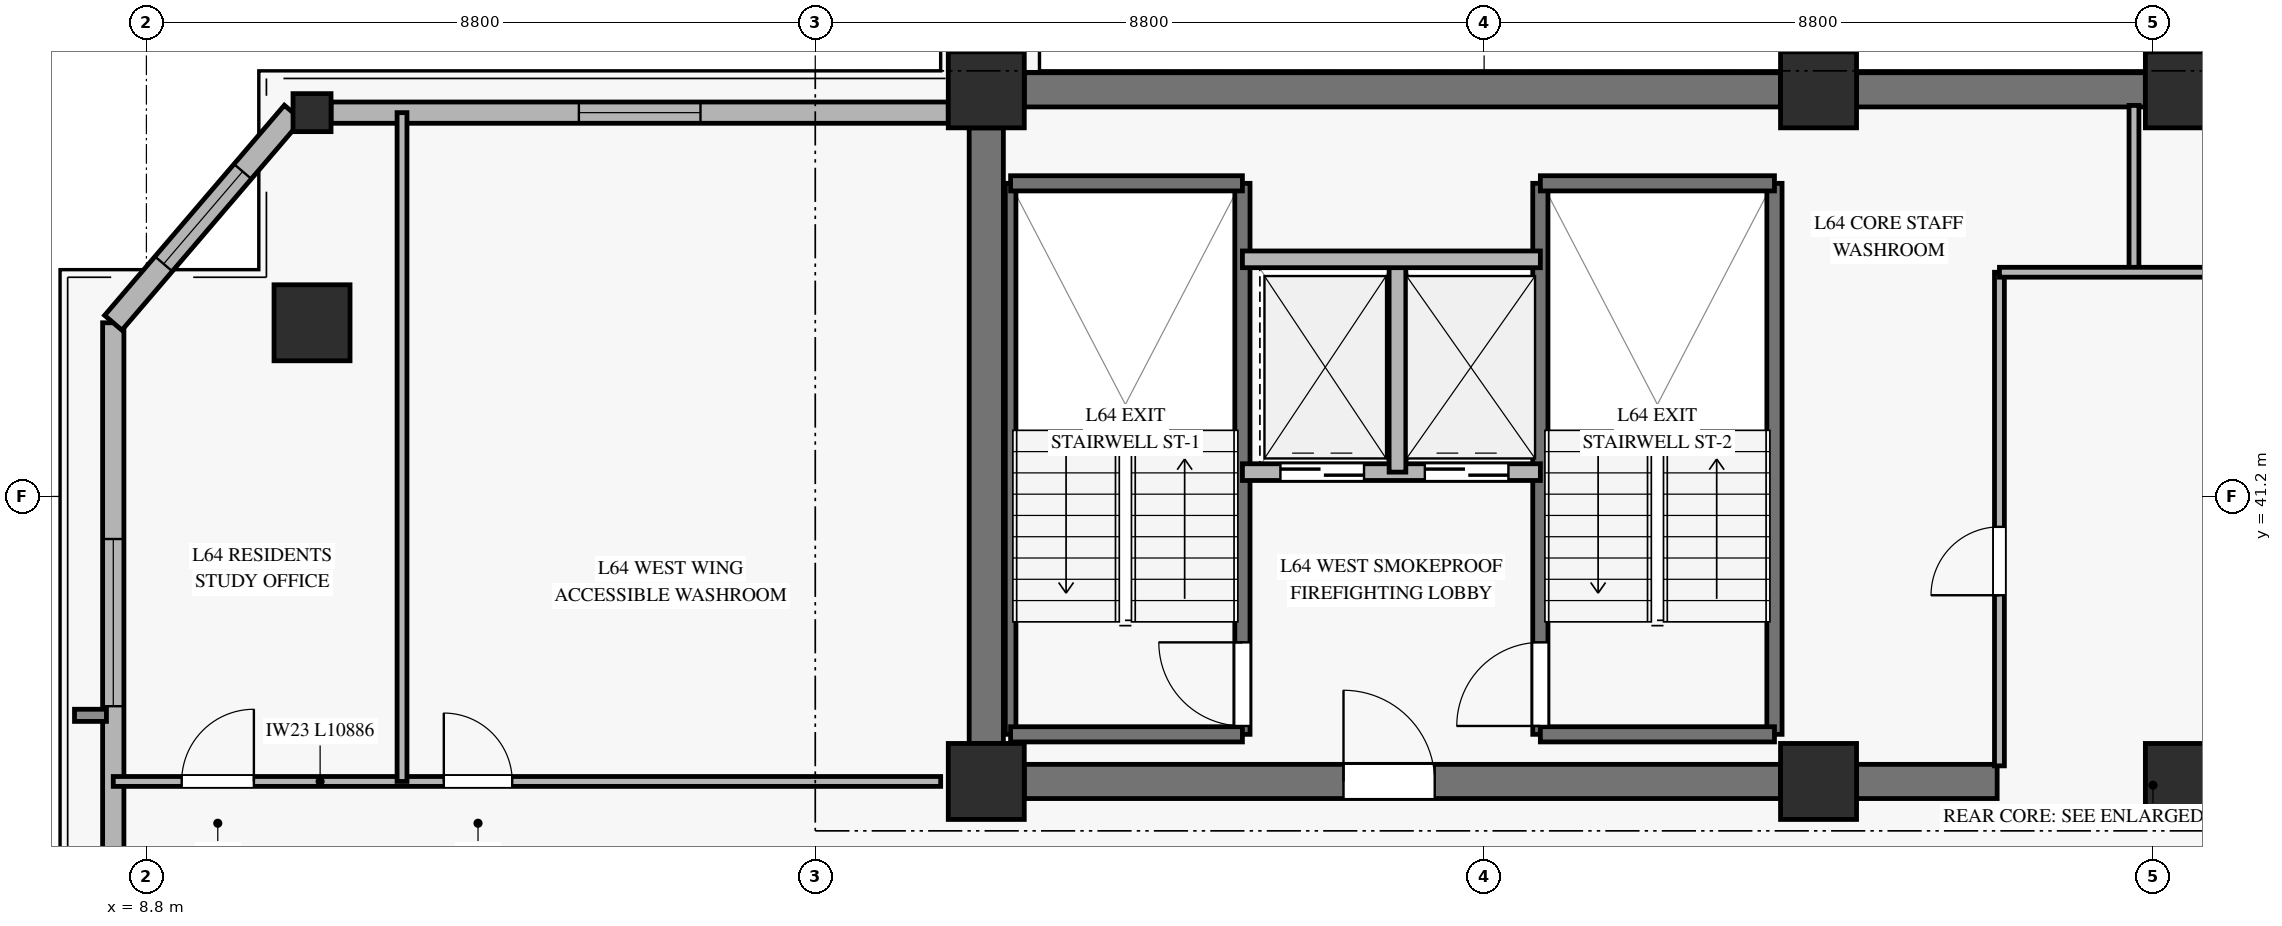
"""IFC4 building model, lengths in metres.
Left out: names, types, materials, properties, quantities, classifications, styles, units other than length and angle.
Written with IfcOpenShell. Run it as: python <this file> out.ifc"""

import sys

from ifc_helpers import new_model, si_unit, direction, frame, frame_2d, origin, origin_2d, place, context, subcontext, project, spatial, rectangle, hollow_rectangle, extrude, source, transform, mapped, element, fill, save


model = new_model("IFC4")
c1 = context("Model", 3, precision=1e-05, world=origin(), true_north=direction((0.0, 1.0)))
c2 = subcontext(c1, "Body", "Model", "MODEL_VIEW")
j1 = project(units=[si_unit("LENGTHUNIT", "METRE"), si_unit("PLANEANGLEUNIT", "RADIAN")], contexts=[c1])
p1 = place(None, origin())
s1 = spatial("IfcSite", under=j1, at=p1, CompositionType="ELEMENT")
p2 = place(p1, origin())
s2 = spatial("IfcBuilding", under=s1, at=p2, CompositionType="ELEMENT")
p3 = place(p2, frame((0.0, 0.0, 251.9)))
s3 = spatial("IfcBuildingStorey", under=s2, at=p3, CompositionType="ELEMENT", Elevation=251.9)
m1 = source(origin(), c2, "Body", "SweptSolid", [
    extrude(rectangle(XDim=1.0, YDim=1.0, at=origin_2d()), origin(), (0.0, 0.0, 1.0), 3.185),
])
for number, where, z_axis, x_axis in (
    (1, (19.85, 37.45, 0.0), (0.0, 0.0, 1.0), (1.0, 0.0, 0.0)),
    (2, (19.85, 46.55, 0.0), (0.0, 0.0, 1.0), (1.0, 0.0, 0.0)),
    (3, (30.8, 37.45, 0.0), (0.0, 0.0, 1.0), (1.0, 0.0, 0.0)),
    (4, (30.8, 46.55, 0.0), (0.0, 0.0, 1.0), (1.0, 0.0, 0.0)),
    (5, (35.6, 37.45, 0.0), (0.0, 0.0, 1.0), (1.0, 0.0, 0.0)),
    (6, (35.6, 46.55, 0.0), (0.0, 0.0, 1.0), (1.0, 0.0, 0.0)),
):
    element("IfcColumn", number, at=place(p3, frame(where, z_axis=z_axis, x_axis=x_axis)), inside=s3, PredefinedType="PILASTER", context=c2, shape_type="MappedRepresentation", body=[
        mapped(m1, transform((0.0, 0.0, 0.0), x_axis=(1.0, 0.0, 0.0), y_axis=(0.0, 1.0, 0.0), z_axis=(0.0, 0.0, 1.0), scale=1.0)),
    ])
p4 = place(p3, frame((20.35, 46.55, 0.0), z_axis=(0.0, 0.0, 1.0), x_axis=(1.0, 0.0, 0.0)))
e7 = element("IfcWall", 7, at=p4, inside=s3, PredefinedType="SHEAR", context=c2, shape_type="SweptSolid", body=[
    extrude(rectangle(XDim=9.95, YDim=0.45, at=frame_2d((4.975, 0.0))), origin(), (0.0, 0.0, 1.0), 3.185),
])
p5 = place(p3, frame((31.3, 46.55, 0.0), z_axis=(0.0, 0.0, 1.0), x_axis=(1.0, 0.0, 0.0)))
e8 = element("IfcWall", 8, at=p5, inside=s3, PredefinedType="SHEAR", context=c2, shape_type="SweptSolid", body=[
    extrude(rectangle(XDim=3.8, YDim=0.45, at=frame_2d((1.9, 0.0))), origin(), (0.0, 0.0, 1.0), 3.185),
])
p6 = place(p3, frame((20.35, 37.45, 0.0), z_axis=(0.0, 0.0, 1.0), x_axis=(1.0, 0.0, 0.0)))
e9 = element("IfcWall", 9, at=p6, inside=s3, PredefinedType="SHEAR", context=c2, shape_type="SweptSolid", body=[
    extrude(rectangle(XDim=9.95, YDim=0.45, at=frame_2d((4.975, 0.0))), origin(), (0.0, 0.0, 1.0), 3.185),
])
p7 = place(p6, frame((4.2, 0.0, 0.0)))
e10 = element("IfcOpeningElement", 10, at=p7, cuts=e9, PredefinedType="OPENING", context=c2, shape_type="SweptSolid", body=[
    extrude(rectangle(XDim=1.2, YDim=2.15, at=frame_2d((0.6, 1.075))), frame((0.0, 0.235, 0.0), z_axis=(0.0, -1.0, 0.0), x_axis=(1.0, 0.0, 0.0)), (0.0, 0.0, 1.0), 0.47),
])
p8 = place(p3, frame((31.3, 37.45, 0.0), z_axis=(0.0, 0.0, 1.0), x_axis=(1.0, 0.0, 0.0)))
e11 = element("IfcWall", 11, at=p8, inside=s3, PredefinedType="SHEAR", context=c2, shape_type="SweptSolid", body=[
    extrude(rectangle(XDim=1.85, YDim=0.45, at=frame_2d((0.925, 0.0))), origin(), (0.0, 0.0, 1.0), 3.185),
])
p9 = place(p3, frame((19.85, 37.95, 0.0), z_axis=(0.0, 0.0, 1.0), x_axis=(0.0, 1.0, 0.0)))
e12 = element("IfcWall", 12, at=p9, inside=s3, PredefinedType="SHEAR", context=c2, shape_type="SweptSolid", body=[
    extrude(rectangle(XDim=8.1, YDim=0.45, at=frame_2d((4.05, 0.0))), origin(), (0.0, 0.0, 1.0), 3.185),
])
m2 = source(origin(), c2, "Body", "SweptSolid", [
    extrude(hollow_rectangle(XDim=1.0, YDim=1.0, WallThickness=0.045, at=origin_2d()), origin(), (0.0, 0.0, 1.0), 3.185),
])
p10 = place(p3, frame((10.979, 43.485, 0.0), z_axis=(0.0, 0.0, 1.0), x_axis=(1.0, 0.0, 0.0)))
e13 = element("IfcColumn", 13, at=p10, inside=s3, PredefinedType="COLUMN", context=c2, shape_type="MappedRepresentation", body=[
    mapped(m2, transform((0.0, 0.0, 0.0), x_axis=(1.0, 0.0, 0.0), y_axis=(0.0, 1.0, 0.0), z_axis=(0.0, 0.0, 1.0), scale=1.0)),
])
m3 = source(origin(), c2, "Body", "SweptSolid", [
    extrude(hollow_rectangle(XDim=0.5, YDim=0.5, WallThickness=0.024, at=origin_2d()), origin(), (0.0, 0.0, 1.0), 3.185),
])
p11 = place(p3, frame((10.979, 46.25, 0.0), z_axis=(0.0, 0.0, 1.0), x_axis=(1.0, 0.0, 0.0)))
e14 = element("IfcColumn", 14, at=p11, inside=s3, PredefinedType="COLUMN", context=c2, shape_type="MappedRepresentation", body=[
    mapped(m3, transform((0.0, 0.0, 0.0), x_axis=(1.0, 0.0, 0.0), y_axis=(0.0, 1.0, 0.0), z_axis=(0.0, 0.0, 1.0), scale=1.0)),
])
p12 = place(p3, frame((8.364, 30.857, 0.0), z_axis=(0.0, 0.0, 1.0), x_axis=(0.0, 1.0, 0.0)))
e15 = element("IfcWall", 15, at=p12, inside=s3, PredefinedType="SOLIDWALL", context=c2, shape_type="SweptSolid", body=[
    extrude(rectangle(XDim=12.628, YDim=0.28, at=frame_2d((6.314, 0.0))), origin(), (0.0, 0.0, 1.0), 2.815),
])
p13 = place(p12, frame((7.583, 0.0, 0.45)))
e16 = element("IfcOpeningElement", 16, at=p13, cuts=e15, PredefinedType="OPENING", context=c2, shape_type="SweptSolid", body=[
    extrude(rectangle(XDim=2.2, YDim=2.1, at=frame_2d((1.1, 1.05))), frame((0.0, 0.15, 0.0), z_axis=(0.0, -1.0, 0.0), x_axis=(1.0, 0.0, 0.0)), (0.0, 0.0, 1.0), 0.3),
])
p14 = place(p3, frame((11.229, 46.25, 0.0), z_axis=(0.0, 0.0, 1.0), x_axis=(1.0, 0.0, 0.0)))
e17 = element("IfcWall", 17, at=p14, inside=s3, PredefinedType="SOLIDWALL", context=c2, shape_type="SweptSolid", body=[
    extrude(rectangle(XDim=8.121, YDim=0.28, at=frame_2d((4.061, 0.0))), origin(), (0.0, 0.0, 1.0), 2.815),
])
p15 = place(p14, frame((3.261, 0.0, 0.45)))
e18 = element("IfcOpeningElement", 18, at=p15, cuts=e17, PredefinedType="OPENING", context=c2, shape_type="SweptSolid", body=[
    extrude(rectangle(XDim=1.6, YDim=2.0, at=frame_2d((0.8, 1.0))), frame((0.0, 0.15, 0.0), z_axis=(0.0, -1.0, 0.0), x_axis=(1.0, 0.0, 0.0)), (0.0, 0.0, 1.0), 0.3),
])
p16 = place(p3, frame((10.729, 46.25, 0.0), z_axis=(0.0, 0.0, 1.0), x_axis=(-0.65001186438, -0.759924059472, 0.0)))
e19 = element("IfcWall", 19, at=p16, inside=s3, PredefinedType="SOLIDWALL", context=c2, shape_type="SweptSolid", body=[
    extrude(rectangle(XDim=3.638, YDim=0.3, at=frame_2d((1.819, 0.0))), origin(), (0.0, 0.0, 1.0), 2.815),
])
p17 = place(p16, frame((1.019, 0.0, 0.45)))
e20 = element("IfcOpeningElement", 20, at=p17, cuts=e19, PredefinedType="OPENING", context=c2, shape_type="SweptSolid", body=[
    extrude(rectangle(XDim=1.6, YDim=2.0, at=frame_2d((0.8, 1.0))), frame((0.0, 0.16, 0.0), z_axis=(0.0, -1.0, 0.0), x_axis=(1.0, 0.0, 0.0)), (0.0, 0.0, 1.0), 0.32),
])
p18 = place(p3, frame((20.17, 38.07, 0.0), z_axis=(0.0, 0.0, 1.0), x_axis=(0.0, 1.0, 0.0)))
e21 = element("IfcWall", 21, at=p18, inside=s3, PredefinedType="SOLIDWALL", context=c2, shape_type="SweptSolid", body=[
    extrude(rectangle(XDim=7.25, YDim=0.14, at=frame_2d((3.625, 0.0))), origin(), (0.0, 0.0, 1.0), 3.4),
])
p19 = place(p3, frame((23.22, 38.07, 0.0), z_axis=(0.0, 0.0, 1.0), x_axis=(0.0, 1.0, 0.0)))
e22 = element("IfcWall", 22, at=p19, inside=s3, PredefinedType="SOLIDWALL", context=c2, shape_type="SweptSolid", body=[
    extrude(rectangle(XDim=7.25, YDim=0.2, at=frame_2d((3.625, 0.0))), origin(), (0.0, 0.0, 1.0), 3.4),
])
p20 = place(p19, frame((0.11, 0.0, 0.0)))
e23 = element("IfcOpeningElement", 23, at=p20, cuts=e22, PredefinedType="OPENING", context=c2, shape_type="SweptSolid", body=[
    extrude(rectangle(XDim=1.1, YDim=2.15, at=frame_2d((0.55, 1.075))), frame((0.0, 0.11, 0.0), z_axis=(0.0, -1.0, 0.0), x_axis=(1.0, 0.0, 0.0)), (0.0, 0.0, 1.0), 0.22),
])
for number, where, z_axis, x_axis in (
    (24, (20.17, 45.32, 0.0), (0.0, 0.0, 1.0), (1.0, 0.0, 0.0)),
    (25, (20.17, 38.07, 0.0), (0.0, 0.0, 1.0), (1.0, 0.0, 0.0)),
):
    element("IfcWall", number, at=place(p3, frame(where, z_axis=z_axis, x_axis=x_axis)), inside=s3, PredefinedType="SOLIDWALL", context=c2, shape_type="SweptSolid", body=[
        extrude(rectangle(XDim=3.05, YDim=0.2, at=frame_2d((1.525, 0.0))), origin(), (0.0, 0.0, 1.0), 3.4),
    ])
p21 = place(p3, frame((27.14, 38.07, 0.0), z_axis=(0.0, 0.0, 1.0), x_axis=(0.0, 1.0, 0.0)))
e26 = element("IfcWall", 26, at=p21, inside=s3, PredefinedType="SOLIDWALL", context=c2, shape_type="SweptSolid", body=[
    extrude(rectangle(XDim=7.25, YDim=0.2, at=frame_2d((3.625, 0.0))), origin(), (0.0, 0.0, 1.0), 3.4),
])
p22 = place(p21, frame((0.11, 0.0, 0.0)))
e27 = element("IfcOpeningElement", 27, at=p22, cuts=e26, PredefinedType="OPENING", context=c2, shape_type="SweptSolid", body=[
    extrude(rectangle(XDim=1.1, YDim=2.15, at=frame_2d((0.55, 1.075))), frame((0.0, 0.11, 0.0), z_axis=(0.0, -1.0, 0.0), x_axis=(1.0, 0.0, 0.0)), (0.0, 0.0, 1.0), 0.22),
])
p23 = place(p3, frame((30.22, 38.07, 0.0), z_axis=(0.0, 0.0, 1.0), x_axis=(0.0, 1.0, 0.0)))
e28 = element("IfcWall", 28, at=p23, inside=s3, PredefinedType="SOLIDWALL", context=c2, shape_type="SweptSolid", body=[
    extrude(rectangle(XDim=7.25, YDim=0.2, at=frame_2d((3.625, 0.0))), origin(), (0.0, 0.0, 1.0), 3.4),
])
for number, where, z_axis, x_axis in (
    (29, (27.14, 45.32, 0.0), (0.0, 0.0, 1.0), (1.0, 0.0, 0.0)),
    (30, (27.14, 38.07, 0.0), (0.0, 0.0, 1.0), (1.0, 0.0, 0.0)),
):
    element("IfcWall", number, at=place(p3, frame(where, z_axis=z_axis, x_axis=x_axis)), inside=s3, PredefinedType="SOLIDWALL", context=c2, shape_type="SweptSolid", body=[
        extrude(rectangle(XDim=3.08, YDim=0.2, at=frame_2d((1.54, 0.0))), origin(), (0.0, 0.0, 1.0), 3.4),
    ])
p24 = place(p3, frame((23.22, 41.52, 0.0), z_axis=(0.0, 0.0, 1.0), x_axis=(1.0, 0.0, 0.0)))
e31 = element("IfcWall", 31, at=p24, inside=s3, PredefinedType="SOLIDWALL", context=c2, shape_type="SweptSolid", body=[
    extrude(rectangle(XDim=3.92, YDim=0.22, at=frame_2d((1.96, 0.0))), origin(), (0.0, 0.0, 1.0), 3.185),
])
p25 = place(p24, frame((0.5, 0.0, 0.0)))
e32 = element("IfcOpeningElement", 32, at=p25, cuts=e31, PredefinedType="OPENING", context=c2, shape_type="SweptSolid", body=[
    extrude(rectangle(XDim=1.1, YDim=2.2, at=frame_2d((0.55, 1.1))), frame((0.0, 0.12, 0.0), z_axis=(0.0, -1.0, 0.0), x_axis=(1.0, 0.0, 0.0)), (0.0, 0.0, 1.0), 0.24),
])
p26 = place(p24, frame((2.4, 0.0, 0.0)))
e33 = element("IfcOpeningElement", 33, at=p26, cuts=e31, PredefinedType="OPENING", context=c2, shape_type="SweptSolid", body=[
    extrude(rectangle(XDim=1.1, YDim=2.2, at=frame_2d((0.55, 1.1))), frame((0.0, 0.12, 0.0), z_axis=(0.0, -1.0, 0.0), x_axis=(1.0, 0.0, 0.0)), (0.0, 0.0, 1.0), 0.24),
])
p27 = place(p3, frame((25.26, 41.52, 0.0), z_axis=(0.0, 0.0, 1.0), x_axis=(0.0, 1.0, 0.0)))
e34 = element("IfcWall", 34, at=p27, inside=s3, PredefinedType="SOLIDWALL", context=c2, shape_type="SweptSolid", body=[
    extrude(rectangle(XDim=2.8, YDim=0.22, at=frame_2d((1.4, 0.0))), origin(), (0.0, 0.0, 1.0), 3.185),
])
p28 = place(p3, frame((23.22, 44.32, 0.0), z_axis=(0.0, 0.0, 1.0), x_axis=(1.0, 0.0, 0.0)))
e35 = element("IfcWall", 35, at=p28, inside=s3, PredefinedType="SOLIDWALL", context=c2, shape_type="SweptSolid", body=[
    extrude(rectangle(XDim=3.92, YDim=0.22, at=frame_2d((1.96, 0.0))), origin(), (0.0, 0.0, 1.0), 3.185),
])
p29 = place(p3, frame((33.18, 37.655, 0.0), z_axis=(0.0, 0.0, 1.0), x_axis=(0.0, 1.0, 0.0)))
e36 = element("IfcWall", 36, at=p29, inside=s3, PredefinedType="PARTITIONING", context=c2, shape_type="SweptSolid", body=[
    extrude(rectangle(XDim=6.495, YDim=0.13, at=frame_2d((3.248, 0.0))), origin(), (0.0, 0.0, 1.0), 2.27),
])
p30 = place(p29, frame((2.245, 0.0, 0.0)))
e37 = element("IfcOpeningElement", 37, at=p30, cuts=e36, PredefinedType="OPENING", context=c2, shape_type="SweptSolid", body=[
    extrude(rectangle(XDim=0.9, YDim=2.1, at=frame_2d((0.45, 1.05))), frame((0.0, 0.075, 0.0), z_axis=(0.0, -1.0, 0.0), x_axis=(1.0, 0.0, 0.0)), (0.0, 0.0, 1.0), 0.15),
])
p31 = place(p3, frame((34.95, 44.15, 0.0), z_axis=(0.0, 0.0, 1.0), x_axis=(0.0, 1.0, 0.0)))
e38 = element("IfcWall", 38, at=p31, inside=s3, PredefinedType="PARTITIONING", context=c2, shape_type="SweptSolid", body=[
    extrude(rectangle(XDim=2.195, YDim=0.13, at=frame_2d((1.098, 0.0))), origin(), (0.0, 0.0, 1.0), 3.185),
])
p32 = place(p3, frame((33.18, 44.15, 0.0), z_axis=(0.0, 0.0, 1.0), x_axis=(1.0, 0.0, 0.0)))
e39 = element("IfcWall", 39, at=p32, inside=s3, PredefinedType="PARTITIONING", context=c2, shape_type="SweptSolid", body=[
    extrude(rectangle(XDim=2.94, YDim=0.13, at=frame_2d((1.47, 0.0))), origin(), (0.0, 0.0, 1.0), 2.47),
])
p33 = place(p3, frame((8.364, 37.45, 0.0), z_axis=(0.0, 0.0, 1.0), x_axis=(1.0, 0.0, 0.0)))
e40 = element("IfcWall", 40, at=p33, inside=s3, PredefinedType="PARTITIONING", context=c2, shape_type="SweptSolid", body=[
    extrude(rectangle(XDim=10.886, YDim=0.13, at=frame_2d((5.443, 0.0))), origin(), (0.0, 0.0, 1.0), 2.82),
])
p34 = place(p33, frame((0.9, 0.0, 0.0)))
e41 = element("IfcOpeningElement", 41, at=p34, cuts=e40, PredefinedType="OPENING", context=c2, shape_type="SweptSolid", body=[
    extrude(rectangle(XDim=0.95, YDim=2.1, at=frame_2d((0.475, 1.05))), frame((0.0, 0.075, 0.0), z_axis=(0.0, -1.0, 0.0), x_axis=(1.0, 0.0, 0.0)), (0.0, 0.0, 1.0), 0.15),
])
p35 = place(p33, frame((4.349, 0.0, 0.0)))
e42 = element("IfcOpeningElement", 42, at=p35, cuts=e40, PredefinedType="OPENING", context=c2, shape_type="SweptSolid", body=[
    extrude(rectangle(XDim=0.9, YDim=2.1, at=frame_2d((0.45, 1.05))), frame((0.0, 0.075, 0.0), z_axis=(0.0, -1.0, 0.0), x_axis=(1.0, 0.0, 0.0)), (0.0, 0.0, 1.0), 0.15),
])
p36 = place(p3, frame((12.163, 37.45, 0.0), z_axis=(0.0, 0.0, 1.0), x_axis=(0.0, 1.0, 0.0)))
e43 = element("IfcWall", 43, at=p36, inside=s3, PredefinedType="PARTITIONING", context=c2, shape_type="SweptSolid", body=[
    extrude(rectangle(XDim=8.8, YDim=0.13, at=frame_2d((4.4, 0.0))), origin(), (0.0, 0.0, 1.0), 3.185),
])
m4 = source(origin(), c2, "Body", "SweptSolid", [
    extrude(rectangle(XDim=2.2, YDim=2.1, at=frame_2d((1.1, 1.05))), frame((0.0, 0.03, 0.0), z_axis=(0.0, -1.0, 0.0), x_axis=(1.0, 0.0, 0.0)), (0.0, 0.0, 1.0), 0.06),
])
p37 = place(p13, origin())
e44 = element("IfcWindow", 44, at=p37, inside=s3, PartitioningType="SINGLE_PANEL", PredefinedType="WINDOW", context=c2, shape_type="MappedRepresentation", body=[
    mapped(m4, transform((0.0, 0.0, 0.0), x_axis=(1.0, 0.0, 0.0), y_axis=(0.0, 1.0, 0.0), z_axis=(0.0, 0.0, 1.0), scale=1.0)),
])
fill(e16, e44)
m5 = source(origin(), c2, "Body", "SweptSolid", [
    extrude(rectangle(XDim=1.6, YDim=2.0, at=frame_2d((0.8, 1.0))), frame((0.0, 0.03, 0.0), z_axis=(0.0, -1.0, 0.0), x_axis=(1.0, 0.0, 0.0)), (0.0, 0.0, 1.0), 0.06),
])
p38 = place(p15, origin())
e45 = element("IfcWindow", 45, at=p38, inside=s3, PartitioningType="SINGLE_PANEL", PredefinedType="WINDOW", context=c2, shape_type="MappedRepresentation", body=[
    mapped(m5, transform((0.0, 0.0, 0.0), x_axis=(1.0, 0.0, 0.0), y_axis=(0.0, 1.0, 0.0), z_axis=(0.0, 0.0, 1.0), scale=1.0)),
])
fill(e18, e45)
p39 = place(p17, origin())
e46 = element("IfcWindow", 46, at=p39, inside=s3, PartitioningType="SINGLE_PANEL", PredefinedType="WINDOW", context=c2, shape_type="MappedRepresentation", body=[
    mapped(m5, transform((0.0, 0.0, 0.0), x_axis=(1.0, 0.0, 0.0), y_axis=(0.0, 1.0, 0.0), z_axis=(0.0, 0.0, 1.0), scale=1.0)),
])
fill(e20, e46)
m6 = source(origin(), c2, "Body", "SweptSolid", [
    extrude(rectangle(XDim=1.1, YDim=2.15, at=frame_2d((0.55, 1.075))), frame((0.0, 0.025, 0.0), z_axis=(0.0, -1.0, 0.0), x_axis=(1.0, 0.0, 0.0)), (0.0, 0.0, 1.0), 0.05),
])
p40 = place(p20, origin())
e47 = element("IfcDoor", 47, at=p40, inside=s3, OperationType="SINGLE_SWING_RIGHT", PredefinedType="DOOR", context=c2, shape_type="MappedRepresentation", body=[
    mapped(m6, transform((0.0, 0.0, 0.0), x_axis=(1.0, 0.0, 0.0), y_axis=(0.0, 1.0, 0.0), z_axis=(0.0, 0.0, 1.0), scale=1.0)),
])
fill(e23, e47)
p41 = place(p22, origin())
e48 = element("IfcDoor", 48, at=p41, inside=s3, OperationType="SINGLE_SWING_LEFT", PredefinedType="DOOR", context=c2, shape_type="MappedRepresentation", body=[
    mapped(m6, transform((0.0, 0.0, 0.0), x_axis=(1.0, 0.0, 0.0), y_axis=(0.0, 1.0, 0.0), z_axis=(0.0, 0.0, 1.0), scale=1.0)),
])
fill(e27, e48)
m7 = source(origin(), c2, "Body", "SweptSolid", [
    extrude(rectangle(XDim=1.1, YDim=2.2, at=frame_2d((0.55, 1.1))), frame((0.0, 0.025, 0.0), z_axis=(0.0, -1.0, 0.0), x_axis=(1.0, 0.0, 0.0)), (0.0, 0.0, 1.0), 0.05),
])
p42 = place(p25, origin())
e49 = element("IfcDoor", 49, at=p42, inside=s3, OperationType="SLIDING_TO_LEFT", PredefinedType="DOOR", context=c2, shape_type="MappedRepresentation", body=[
    mapped(m7, transform((0.0, 0.0, 0.0), x_axis=(1.0, 0.0, 0.0), y_axis=(0.0, 1.0, 0.0), z_axis=(0.0, 0.0, 1.0), scale=1.0)),
])
fill(e32, e49)
p43 = place(p26, origin())
e50 = element("IfcDoor", 50, at=p43, inside=s3, OperationType="SLIDING_TO_LEFT", PredefinedType="DOOR", context=c2, shape_type="MappedRepresentation", body=[
    mapped(m7, transform((0.0, 0.0, 0.0), x_axis=(1.0, 0.0, 0.0), y_axis=(0.0, 1.0, 0.0), z_axis=(0.0, 0.0, 1.0), scale=1.0)),
])
fill(e33, e50)
m8 = source(origin(), c2, "Body", "SweptSolid", [
    extrude(rectangle(XDim=1.2, YDim=2.15, at=frame_2d((0.6, 1.075))), frame((0.0, 0.025, 0.0), z_axis=(0.0, -1.0, 0.0), x_axis=(1.0, 0.0, 0.0)), (0.0, 0.0, 1.0), 0.05),
])
p44 = place(p7, origin())
e51 = element("IfcDoor", 51, at=p44, inside=s3, OperationType="SINGLE_SWING_LEFT", PredefinedType="DOOR", context=c2, shape_type="MappedRepresentation", body=[
    mapped(m8, transform((0.0, 0.0, 0.0), x_axis=(1.0, 0.0, 0.0), y_axis=(0.0, 1.0, 0.0), z_axis=(0.0, 0.0, 1.0), scale=1.0)),
])
fill(e10, e51)
m9 = source(origin(), c2, "Body", "SweptSolid", [
    extrude(rectangle(XDim=0.9, YDim=2.1, at=frame_2d((0.45, 1.05))), frame((0.0, 0.025, 0.0), z_axis=(0.0, -1.0, 0.0), x_axis=(1.0, 0.0, 0.0)), (0.0, 0.0, 1.0), 0.05),
])
p45 = place(p30, origin())
e52 = element("IfcDoor", 52, at=p45, inside=s3, OperationType="SINGLE_SWING_LEFT", PredefinedType="DOOR", context=c2, shape_type="MappedRepresentation", body=[
    mapped(m9, transform((0.0, 0.0, 0.0), x_axis=(1.0, 0.0, 0.0), y_axis=(0.0, 1.0, 0.0), z_axis=(0.0, 0.0, 1.0), scale=1.0)),
])
fill(e37, e52)
m10 = source(origin(), c2, "Body", "SweptSolid", [
    extrude(rectangle(XDim=0.95, YDim=2.1, at=frame_2d((0.475, 1.05))), frame((0.0, 0.025, 0.0), z_axis=(0.0, -1.0, 0.0), x_axis=(1.0, 0.0, 0.0)), (0.0, 0.0, 1.0), 0.05),
])
p46 = place(p34, origin())
e53 = element("IfcDoor", 53, at=p46, inside=s3, OperationType="SINGLE_SWING_RIGHT", PredefinedType="DOOR", context=c2, shape_type="MappedRepresentation", body=[
    mapped(m10, transform((0.0, 0.0, 0.0), x_axis=(1.0, 0.0, 0.0), y_axis=(0.0, 1.0, 0.0), z_axis=(0.0, 0.0, 1.0), scale=1.0)),
])
fill(e41, e53)
p47 = place(p35, origin())
e54 = element("IfcDoor", 54, at=p47, inside=s3, OperationType="SINGLE_SWING_LEFT", PredefinedType="DOOR", context=c2, shape_type="MappedRepresentation", body=[
    mapped(m9, transform((0.0, 0.0, 0.0), x_axis=(1.0, 0.0, 0.0), y_axis=(0.0, 1.0, 0.0), z_axis=(0.0, 0.0, 1.0), scale=1.0)),
])
fill(e42, e54)
save(model, sys.argv[1])
